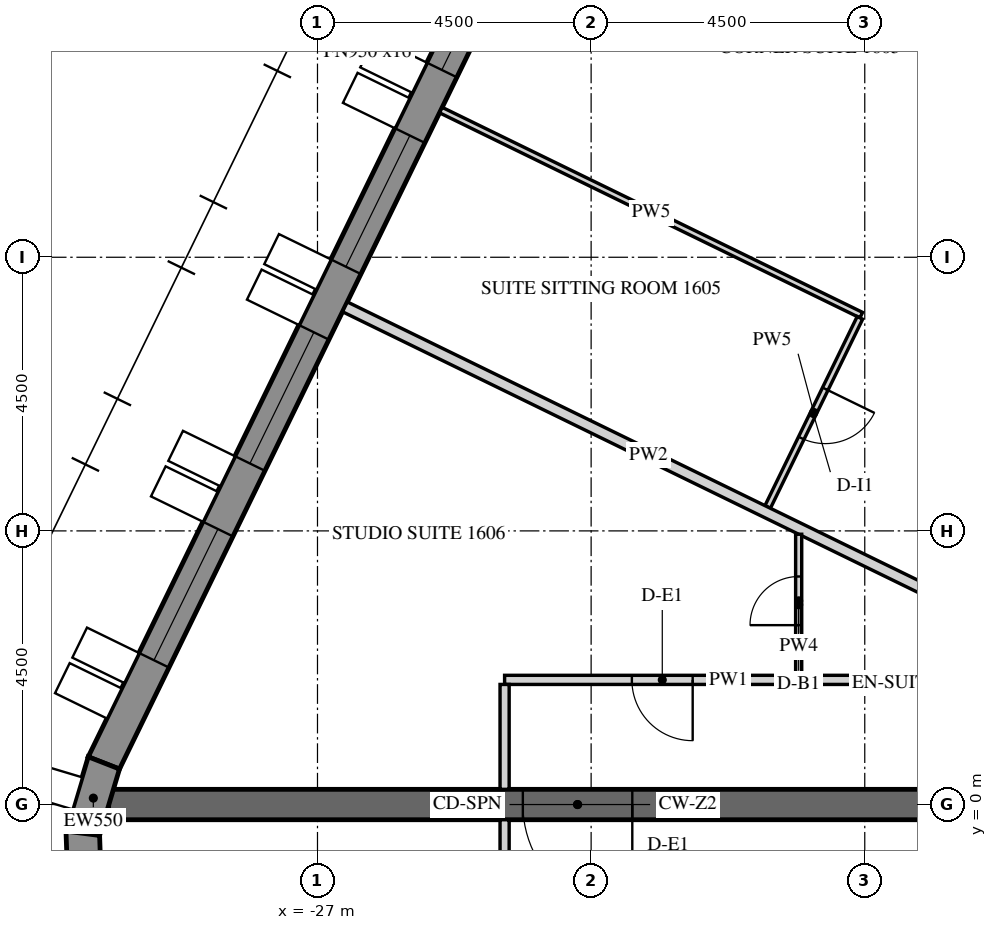
"""IFC4 building model, lengths in metres.
Left out: names, types, materials, properties, quantities, classifications, styles, units other than length and angle.
Written with IfcOpenShell. Run it as: python <this file> out.ifc"""

import sys

from ifc_helpers import new_model, si_unit, direction, frame, frame_2d, origin, place, context, subcontext, project, spatial, polyline, rectangle, outline, extrude, element, fill, save


model = new_model("IFC4")
c1 = context("Model", 3, precision=1e-05, world=origin(), true_north=direction((0.0, 1.0)))
c2 = subcontext(c1, "Body", "Model", "MODEL_VIEW")
j1 = project(units=[si_unit("LENGTHUNIT", "METRE"), si_unit("PLANEANGLEUNIT", "RADIAN")], contexts=[c1])
p1 = place(None, origin())
s1 = spatial("IfcSite", under=j1, at=p1, CompositionType="ELEMENT")
p2 = place(p1, origin())
s2 = spatial("IfcBuilding", under=s1, at=p2, CompositionType="ELEMENT")
p3 = place(p2, frame((0.0, 0.0, 207.3)))
s3 = spatial("IfcBuildingStorey", under=s2, at=p3, CompositionType="ELEMENT", Elevation=207.3)
p4 = place(p3, frame((-18.345, 25.633, -0.15), z_axis=(0.0, 0.0, 1.0), x_axis=(-0.43837181828, -0.898793718791, 0.0)))
e1 = element("IfcWall", 1, at=p4, inside=s3, PredefinedType="SOLIDWALL", context=c2, shape_type="SweptSolid", body=[
    extrude(outline(polyline([(-0.026, -0.275), (27.78, -0.275), (27.735, 0.275), (0.026, 0.275), (-0.026, -0.275)])), origin(), (0.0, 0.0, 1.0), 3.9),
])
p5 = place(p4, frame((1.879, 0.0, 1.05)))
e2 = element("IfcOpeningElement", 2, at=p5, cuts=e1, PredefinedType="OPENING", context=c2, shape_type="SweptSolid", body=[
    extrude(rectangle(XDim=2.4, YDim=2.4, at=frame_2d((1.2, 1.2))), frame((0.0, 0.285, 0.0), z_axis=(0.0, -1.0, 0.0), x_axis=(1.0, 0.0, 0.0)), (0.0, 0.0, 1.0), 0.57),
])
p6 = place(p4, frame((5.479, 0.0, 1.05)))
e3 = element("IfcOpeningElement", 3, at=p6, cuts=e1, PredefinedType="OPENING", context=c2, shape_type="SweptSolid", body=[
    extrude(rectangle(XDim=2.4, YDim=2.4, at=frame_2d((1.2, 1.2))), frame((0.0, 0.285, 0.0), z_axis=(0.0, -1.0, 0.0), x_axis=(1.0, 0.0, 0.0)), (0.0, 0.0, 1.0), 0.57),
])
p7 = place(p4, frame((9.079, 0.0, 1.05)))
e4 = element("IfcOpeningElement", 4, at=p7, cuts=e1, PredefinedType="OPENING", context=c2, shape_type="SweptSolid", body=[
    extrude(rectangle(XDim=2.4, YDim=2.4, at=frame_2d((1.2, 1.2))), frame((0.0, 0.285, 0.0), z_axis=(0.0, -1.0, 0.0), x_axis=(1.0, 0.0, 0.0)), (0.0, 0.0, 1.0), 0.57),
])
p8 = place(p4, frame((12.679, 0.0, 1.05)))
e5 = element("IfcOpeningElement", 5, at=p8, cuts=e1, PredefinedType="OPENING", context=c2, shape_type="SweptSolid", body=[
    extrude(rectangle(XDim=2.4, YDim=2.4, at=frame_2d((1.2, 1.2))), frame((0.0, 0.285, 0.0), z_axis=(0.0, -1.0, 0.0), x_axis=(1.0, 0.0, 0.0)), (0.0, 0.0, 1.0), 0.57),
])
p9 = place(p4, frame((16.279, 0.0, 1.05)))
e6 = element("IfcOpeningElement", 6, at=p9, cuts=e1, PredefinedType="OPENING", context=c2, shape_type="SweptSolid", body=[
    extrude(rectangle(XDim=2.4, YDim=2.4, at=frame_2d((1.2, 1.2))), frame((0.0, 0.285, 0.0), z_axis=(0.0, -1.0, 0.0), x_axis=(1.0, 0.0, 0.0)), (0.0, 0.0, 1.0), 0.57),
])
p10 = place(p4, frame((19.879, 0.0, 1.05)))
e7 = element("IfcOpeningElement", 7, at=p10, cuts=e1, PredefinedType="OPENING", context=c2, shape_type="SweptSolid", body=[
    extrude(rectangle(XDim=2.4, YDim=2.4, at=frame_2d((1.2, 1.2))), frame((0.0, 0.285, 0.0), z_axis=(0.0, -1.0, 0.0), x_axis=(1.0, 0.0, 0.0)), (0.0, 0.0, 1.0), 0.57),
])
p11 = place(p4, frame((23.479, 0.0, 1.05)))
e8 = element("IfcOpeningElement", 8, at=p11, cuts=e1, PredefinedType="OPENING", context=c2, shape_type="SweptSolid", body=[
    extrude(rectangle(XDim=2.4, YDim=2.4, at=frame_2d((1.2, 1.2))), frame((0.0, 0.285, 0.0), z_axis=(0.0, -1.0, 0.0), x_axis=(1.0, 0.0, 0.0)), (0.0, 0.0, 1.0), 0.57),
])
p12 = place(p3, frame((-30.513, 0.684, -0.15), z_axis=(0.0, 0.0, 1.0), x_axis=(-0.286736058109, -0.958009620505, 0.0)))
e9 = element("IfcWall", 9, at=p12, inside=s3, PredefinedType="SOLIDWALL", context=c2, shape_type="SweptSolid", body=[
    extrude(outline(polyline([(-0.022, -0.275), (1.253, -0.275), (1.163, 0.275), (0.022, 0.275), (-0.022, -0.275)])), origin(), (0.0, 0.0, 1.0), 3.9),
])
p13 = place(p3, frame((-30.86, -0.473, -0.15), z_axis=(0.0, 0.0, 1.0), x_axis=(0.03495638276, -0.999388838893, 0.0)))
e10 = element("IfcWall", 10, at=p13, inside=s3, PredefinedType="SOLIDWALL", context=c2, shape_type="SweptSolid", body=[
    extrude(outline(polyline([(-0.045, -0.275), (1.253, -0.275), (1.163, 0.275), (0.045, 0.275), (-0.045, -0.275)])), origin(), (0.0, 0.0, 1.0), 3.9),
])
p14 = place(p3, frame((-15.011, 0.0, -0.15), z_axis=(0.0, 0.0, 1.0), x_axis=(-1.0, 0.0, 0.0)))
e11 = element("IfcWall", 11, at=p14, inside=s3, PredefinedType="SHEAR", context=c2, shape_type="SweptSolid", body=[
    extrude(rectangle(XDim=15.424, YDim=0.5, at=frame_2d((7.712, 0.0))), origin(), (0.0, 0.0, 1.0), 3.9),
])
p15 = place(p14, frame((6.812, 0.0, 0.15)))
e12 = element("IfcOpeningElement", 12, at=p15, cuts=e11, PredefinedType="OPENING", context=c2, shape_type="SweptSolid", body=[
    extrude(rectangle(XDim=1.8, YDim=2.4, at=frame_2d((0.9, 1.2))), frame((0.0, 0.26, 0.0), z_axis=(0.0, -1.0, 0.0), x_axis=(1.0, 0.0, 0.0)), (0.0, 0.0, 1.0), 0.52),
])
p16 = place(p3, frame((-16.562, 2.05, 0.0), z_axis=(0.0, 0.0, 1.0), x_axis=(-1.0, 0.0, 0.0)))
e13 = element("IfcWall", 13, at=p16, inside=s3, PredefinedType="PARTITIONING", context=c2, shape_type="SweptSolid", body=[
    extrude(rectangle(XDim=7.361, YDim=0.15, at=frame_2d((3.68, 0.0))), origin(), (0.0, 0.0, 1.0), 2.988),
])
p17 = place(p16, frame((4.268, 0.0, 0.0)))
e14 = element("IfcOpeningElement", 14, at=p17, cuts=e13, PredefinedType="OPENING", context=c2, shape_type="SweptSolid", body=[
    extrude(rectangle(XDim=1.0, YDim=2.1, at=frame_2d((0.5, 1.05))), frame((0.0, 0.085, 0.0), z_axis=(0.0, -1.0, 0.0), x_axis=(1.0, 0.0, 0.0)), (0.0, 0.0, 1.0), 0.17),
])
p18 = place(p3, frame((-23.923, 1.975, 0.0), z_axis=(0.0, 0.0, 1.0), x_axis=(0.0, -1.0, 0.0)))
e15 = element("IfcWall", 15, at=p18, inside=s3, PredefinedType="PARTITIONING", context=c2, shape_type="SweptSolid", body=[
    extrude(rectangle(XDim=1.725, YDim=0.15, at=frame_2d((0.863, 0.0))), origin(), (0.0, 0.0, 1.0), 2.988),
])
p19 = place(p3, frame((-23.923, -0.25, 0.0), z_axis=(0.0, 0.0, 1.0), x_axis=(0.0, -1.0, 0.0)))
e16 = element("IfcWall", 16, at=p19, inside=s3, PredefinedType="PARTITIONING", context=c2, shape_type="SweptSolid", body=[
    extrude(rectangle(XDim=1.8, YDim=0.15, at=frame_2d((0.9, 0.0))), origin(), (0.0, 0.0, 1.0), 2.988),
])
p20 = place(p3, frame((-21.815, 17.892, 0.0), z_axis=(0.0, 0.0, 1.0), x_axis=(0.898799253997, -0.438360469265, 0.0)))
e17 = element("IfcWall", 17, at=p20, inside=s3, PredefinedType="PARTITIONING", context=c2, shape_type="SweptSolid", body=[
    extrude(rectangle(XDim=12.794, YDim=0.18, at=frame_2d((6.397, 0.0))), origin(), (0.0, 0.0, 1.0), 2.988),
])
p21 = place(p3, frame((-24.971, 11.42, 0.0), z_axis=(0.0, 0.0, 1.0), x_axis=(0.89880199998, -0.438354838951, 0.0)))
e18 = element("IfcWall", 18, at=p21, inside=s3, PredefinedType="PARTITIONING", context=c2, shape_type="SweptSolid", body=[
    extrude(rectangle(XDim=7.691, YDim=0.1, at=frame_2d((3.846, 0.0))), origin(), (0.0, 0.0, 1.0), 2.988),
])
p22 = place(p3, frame((-18.08, 8.004, 0.0), z_axis=(0.0, 0.0, 1.0), x_axis=(-0.438386097111, -0.898786754386, 0.0)))
e19 = element("IfcWall", 19, at=p22, inside=s3, PredefinedType="PARTITIONING", context=c2, shape_type="SweptSolid", body=[
    extrude(rectangle(XDim=3.46, YDim=0.1, at=frame_2d((1.73, 0.0))), origin(), (0.0, 0.0, 1.0), 2.988),
])
p23 = place(p22, frame((1.3, 0.0, 0.0)))
e20 = element("IfcOpeningElement", 20, at=p23, cuts=e19, PredefinedType="OPENING", context=c2, shape_type="SweptSolid", body=[
    extrude(rectangle(XDim=0.9, YDim=2.1, at=frame_2d((0.45, 1.05))), frame((0.0, 0.06, 0.0), z_axis=(0.0, -1.0, 0.0), x_axis=(1.0, 0.0, 0.0)), (0.0, 0.0, 1.0), 0.12),
])
p24 = place(p3, frame((-26.549, 8.185, 0.0), z_axis=(0.0, 0.0, 1.0), x_axis=(0.898799907013, -0.43835913034, 0.0)))
e21 = element("IfcWall", 21, at=p24, inside=s3, PredefinedType="PARTITIONING", context=c2, shape_type="SweptSolid", body=[
    extrude(rectangle(XDim=11.112, YDim=0.18, at=frame_2d((5.556, 0.0))), origin(), (0.0, 0.0, 1.0), 2.988),
])
p25 = place(p3, frame((-19.087, 2.125, 0.0), z_axis=(0.0, 0.0, 1.0), x_axis=(0.0, 1.0, 0.0)))
e22 = element("IfcWall", 22, at=p25, inside=s3, PredefinedType="PARTITIONING", context=c2, shape_type="SweptSolid", body=[
    extrude(rectangle(XDim=2.32, YDim=0.1, at=frame_2d((1.16, 0.0))), origin(), (0.0, 0.0, 1.0), 2.988),
])
p26 = place(p25, frame((0.825, 0.0, 0.0)))
e23 = element("IfcOpeningElement", 23, at=p26, cuts=e22, PredefinedType="OPENING", context=c2, shape_type="SweptSolid", body=[
    extrude(rectangle(XDim=0.8, YDim=2.1, at=frame_2d((0.4, 1.05))), frame((0.0, 0.06, 0.0), z_axis=(0.0, -1.0, 0.0), x_axis=(1.0, 0.0, 0.0)), (0.0, 0.0, 1.0), 0.12),
])
p27 = place(p8, frame((0.0, 0.205, 0.0)))
e24 = element("IfcWindow", 24, at=p27, inside=s3, PartitioningType="DOUBLE_PANEL_VERTICAL", PredefinedType="WINDOW", context=c2, shape_type="SweptSolid", body=[
    extrude(rectangle(XDim=2.4, YDim=2.4, at=frame_2d((1.2, 1.2))), frame((0.0, 0.03, 0.0), z_axis=(0.0, -1.0, 0.0), x_axis=(1.0, 0.0, 0.0)), (0.0, 0.0, 1.0), 0.06),
])
fill(e5, e24)
p28 = place(p9, frame((0.0, 0.205, 0.0)))
e25 = element("IfcWindow", 25, at=p28, inside=s3, PartitioningType="DOUBLE_PANEL_VERTICAL", PredefinedType="WINDOW", context=c2, shape_type="SweptSolid", body=[
    extrude(rectangle(XDim=2.4, YDim=2.4, at=frame_2d((1.2, 1.2))), frame((0.0, 0.03, 0.0), z_axis=(0.0, -1.0, 0.0), x_axis=(1.0, 0.0, 0.0)), (0.0, 0.0, 1.0), 0.06),
])
fill(e6, e25)
p29 = place(p10, frame((0.0, 0.205, 0.0)))
e26 = element("IfcWindow", 26, at=p29, inside=s3, PartitioningType="DOUBLE_PANEL_VERTICAL", PredefinedType="WINDOW", context=c2, shape_type="SweptSolid", body=[
    extrude(rectangle(XDim=2.4, YDim=2.4, at=frame_2d((1.2, 1.2))), frame((0.0, 0.03, 0.0), z_axis=(0.0, -1.0, 0.0), x_axis=(1.0, 0.0, 0.0)), (0.0, 0.0, 1.0), 0.06),
])
fill(e7, e26)
p30 = place(p11, frame((0.0, 0.205, 0.0)))
e27 = element("IfcWindow", 27, at=p30, inside=s3, PartitioningType="DOUBLE_PANEL_VERTICAL", PredefinedType="WINDOW", context=c2, shape_type="SweptSolid", body=[
    extrude(rectangle(XDim=2.4, YDim=2.4, at=frame_2d((1.2, 1.2))), frame((0.0, 0.03, 0.0), z_axis=(0.0, -1.0, 0.0), x_axis=(1.0, 0.0, 0.0)), (0.0, 0.0, 1.0), 0.06),
])
fill(e8, e27)
p31 = place(p15, origin())
e28 = element("IfcDoor", 28, at=p31, inside=s3, OperationType="DOUBLE_DOOR_SINGLE_SWING", PredefinedType="DOOR", context=c2, shape_type="SweptSolid", body=[
    extrude(rectangle(XDim=1.8, YDim=2.4, at=frame_2d((0.9, 1.2))), frame((0.0, 0.025, 0.0), z_axis=(0.0, -1.0, 0.0), x_axis=(1.0, 0.0, 0.0)), (0.0, 0.0, 1.0), 0.05),
])
fill(e12, e28)
p32 = place(p23, origin())
e29 = element("IfcDoor", 29, at=p32, inside=s3, OperationType="SINGLE_SWING_RIGHT", PredefinedType="DOOR", context=c2, shape_type="SweptSolid", body=[
    extrude(rectangle(XDim=0.9, YDim=2.1, at=frame_2d((0.45, 1.05))), frame((0.0, 0.025, 0.0), z_axis=(0.0, -1.0, 0.0), x_axis=(1.0, 0.0, 0.0)), (0.0, 0.0, 1.0), 0.05),
])
fill(e20, e29)
p33 = place(p17, origin())
e30 = element("IfcDoor", 30, at=p33, inside=s3, OperationType="SINGLE_SWING_RIGHT", PredefinedType="DOOR", context=c2, shape_type="SweptSolid", body=[
    extrude(rectangle(XDim=1.0, YDim=2.1, at=frame_2d((0.5, 1.05))), frame((0.0, 0.025, 0.0), z_axis=(0.0, -1.0, 0.0), x_axis=(1.0, 0.0, 0.0)), (0.0, 0.0, 1.0), 0.05),
])
fill(e14, e30)
p34 = place(p26, origin())
e31 = element("IfcDoor", 31, at=p34, inside=s3, OperationType="SINGLE_SWING_LEFT", PredefinedType="DOOR", context=c2, shape_type="SweptSolid", body=[
    extrude(rectangle(XDim=0.8, YDim=2.1, at=frame_2d((0.4, 1.05))), frame((0.0, 0.025, 0.0), z_axis=(0.0, -1.0, 0.0), x_axis=(1.0, 0.0, 0.0)), (0.0, 0.0, 1.0), 0.05),
])
fill(e23, e31)
save(model, sys.argv[1])
